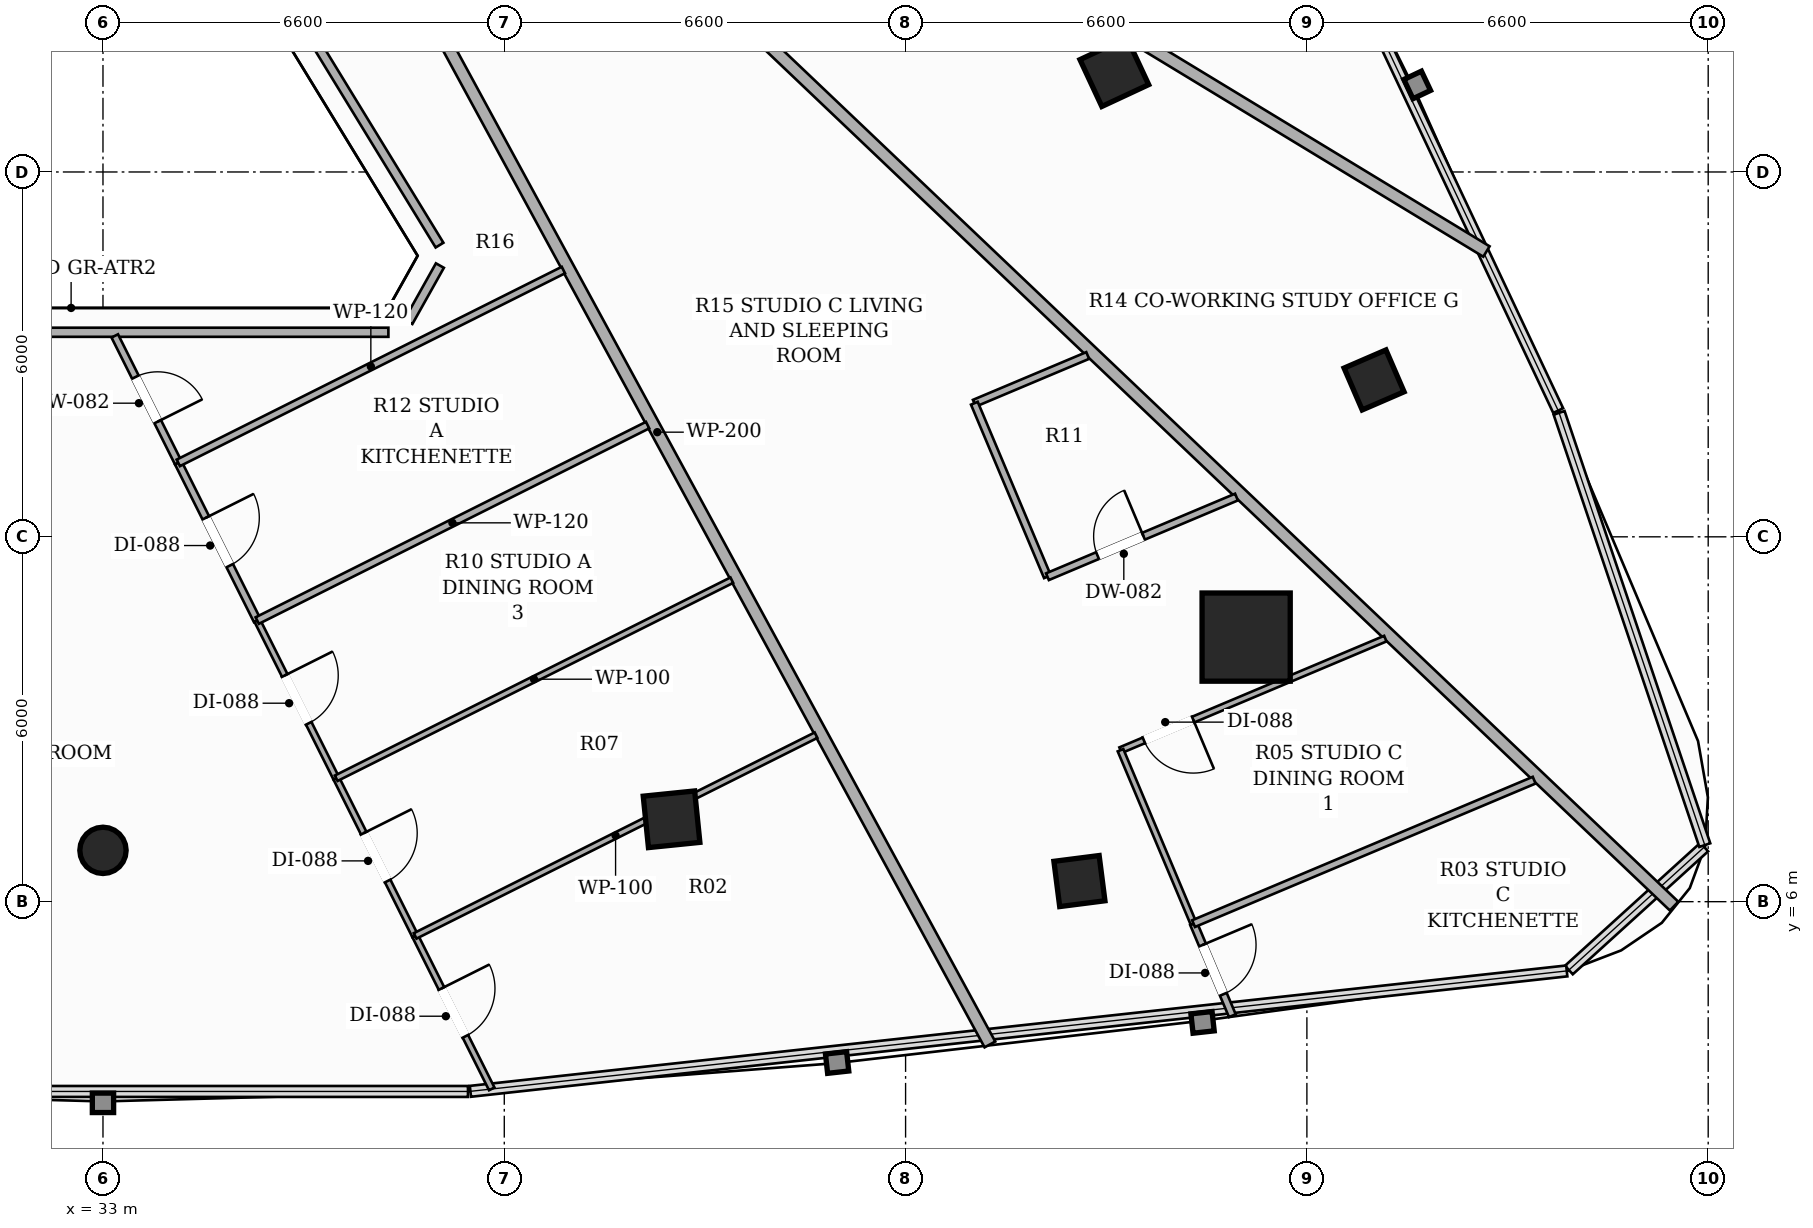
"""IFC4 building model, lengths in metres.
Left out: names, types, materials, properties, quantities, classifications, styles, units other than length and angle.
Written with IfcOpenShell. Run it as: python <this file> out.ifc"""

import sys

from ifc_helpers import new_model, si_unit, direction, frame, frame_2d, origin, origin_2d, place, context, subcontext, project, spatial, rectangle, hollow_rectangle, hollow_circle, extrude, element, fill, save


model = new_model("IFC4")
c1 = context("Model", 3, precision=1e-05, world=origin(), true_north=direction((0.0, 1.0)))
c2 = subcontext(c1, "Body", "Model", "MODEL_VIEW")
j1 = project(units=[si_unit("LENGTHUNIT", "METRE"), si_unit("PLANEANGLEUNIT", "RADIAN")], contexts=[c1])
p1 = place(None, origin())
s1 = spatial("IfcSite", under=j1, at=p1, CompositionType="ELEMENT")
p2 = place(p1, origin())
s2 = spatial("IfcBuilding", under=s1, at=p2, CompositionType="ELEMENT")
p3 = place(p2, frame((0.0, 0.0, 110.0)))
s3 = spatial("IfcBuildingStorey", under=s2, at=p3, CompositionType="ELEMENT", Elevation=110.0)
p4 = place(p3, frame((51.801, 10.351, 0.0), z_axis=(0.0, 0.0, 1.0), x_axis=(1.0, 0.0, 0.0)))
e1 = element("IfcColumn", 1, at=p4, inside=s3, PredefinedType="COLUMN", context=c2, shape_type="SweptSolid", body=[
    extrude(hollow_rectangle(XDim=1.45, YDim=1.45, WallThickness=0.045, at=origin_2d()), origin(), (0.0, 0.0, 1.0), 3.3),
])
p5 = place(p3, frame((33.0, 6.844, 0.0), z_axis=(0.0, 0.0, 1.0), x_axis=(1.0, 0.0, 0.0)))
e2 = element("IfcColumn", 2, at=p5, inside=s3, PredefinedType="COLUMN", context=c2, shape_type="SweptSolid", body=[
    extrude(hollow_circle(Radius=0.381, WallThickness=0.022, at=origin_2d()), origin(), (0.0, 0.0, 1.0), 3.3),
])
for number, where, z_axis, x_axis in (
    (3, (42.351, 7.355, 0.0), (0.0, 0.0, 1.0), (0.995, 0.101, 0.0)),
    (4, (49.633, 19.642, 0.0), (0.0, 0.0, 1.0), (-0.423, 0.906, 0.0)),
):
    element("IfcColumn", number, at=place(p3, frame(where, z_axis=z_axis, x_axis=x_axis)), inside=s3, PredefinedType="COLUMN", context=c2, shape_type="SweptSolid", body=[
        extrude(hollow_rectangle(XDim=0.85, YDim=0.85, WallThickness=0.028, at=origin_2d()), origin(), (0.0, 0.0, 1.0), 3.3),
    ])
for number, where, z_axis, x_axis in (
    (5, (49.059, 6.339, 0.0), (0.0, 0.0, 1.0), (0.992, 0.127, 0.0)),
    (6, (53.905, 14.58, 0.0), (0.0, 0.0, 1.0), (-0.397, 0.918, 0.0)),
):
    element("IfcColumn", number, at=place(p3, frame(where, z_axis=z_axis, x_axis=x_axis)), inside=s3, PredefinedType="COLUMN", context=c2, shape_type="SweptSolid", body=[
        extrude(hollow_rectangle(XDim=0.75, YDim=0.75, WallThickness=0.025, at=origin_2d()), origin(), (0.0, 0.0, 1.0), 3.3),
    ])
p6 = place(p3, frame((34.257, 23.79, 0.0), z_axis=(0.0, 0.0, 1.0), x_axis=(0.521839061235, -0.853043957935, 0.0)))
e7 = element("IfcWall", 7, at=p6, inside=s3, PredefinedType="PARTITIONING", context=c2, shape_type="SweptSolid", body=[
    extrude(rectangle(XDim=8.198, YDim=0.15, at=frame_2d((4.099, 0.0))), origin(), (0.0, 0.0, 1.0), 2.721),
])
p7 = place(p3, frame((38.541, 16.461, 0.0), z_axis=(0.0, 0.0, 1.0), x_axis=(-0.488631416095, -0.872490308946, 0.0)))
e8 = element("IfcWall", 8, at=p7, inside=s3, PredefinedType="PARTITIONING", context=c2, shape_type="SweptSolid", body=[
    extrude(rectangle(XDim=1.06, YDim=0.15, at=frame_2d((0.53, 0.0))), origin(), (0.0, 0.0, 1.0), 3.06),
])
p8 = place(p3, frame((37.694, 15.364, 0.0), z_axis=(0.0, 0.0, 1.0), x_axis=(-1.0, 0.0, 0.0)))
e9 = element("IfcWall", 9, at=p8, inside=s3, PredefinedType="PARTITIONING", context=c2, shape_type="SweptSolid", body=[
    extrude(rectangle(XDim=9.388, YDim=0.15, at=frame_2d((4.694, 0.0))), origin(), (0.0, 0.0, 1.0), 2.721),
])
p9 = place(p3, frame((36.646, 23.79, 0.0), z_axis=(0.0, 0.0, 1.0), x_axis=(0.477391569207, -0.878690667784, 0.0)))
e10 = element("IfcWall", 10, at=p9, inside=s3, PredefinedType="PARTITIONING", context=c2, shape_type="SweptSolid", body=[
    extrude(rectangle(XDim=22.918, YDim=0.2, at=frame_2d((11.459, 0.0))), origin(), (0.0, 0.0, 1.0), 2.413),
])
p10 = place(p3, frame((40.056, 23.79, 0.0), z_axis=(0.0, 0.0, 1.0), x_axis=(0.724633427165, -0.68913452695, 0.0)))
e11 = element("IfcWall", 11, at=p10, inside=s3, PredefinedType="PARTITIONING", context=c2, shape_type="SweptSolid", body=[
    extrude(rectangle(XDim=25.921, YDim=0.2, at=frame_2d((12.96, 0.0))), origin(), (0.0, 0.0, 1.0), 2.413),
])
p11 = place(p3, frame((55.753, 16.692, 0.0), z_axis=(0.0, 0.0, 1.0), x_axis=(-0.85489976131, 0.518793213248, 0.0)))
e12 = element("IfcWall", 12, at=p11, inside=s3, PredefinedType="PARTITIONING", context=c2, shape_type="SweptSolid", body=[
    extrude(rectangle(XDim=15.608, YDim=0.2, at=frame_2d((7.804, 0.0))), origin(), (0.0, 0.0, 1.0), 2.413),
])
p12 = place(p3, frame((33.194, 15.304, 0.0), z_axis=(0.0, 0.0, 1.0), x_axis=(0.447548179666, -0.894259820677, 0.0)))
e13 = element("IfcWall", 13, at=p12, inside=s3, PredefinedType="PARTITIONING", context=c2, shape_type="SweptSolid", body=[
    extrude(rectangle(XDim=2.335, YDim=0.12, at=frame_2d((1.167, 0.0))), origin(), (0.0, 0.0, 1.0), 2.721),
])
p13 = place(p12, frame((0.757, 0.0, 0.0)))
e14 = element("IfcOpeningElement", 14, at=p13, cuts=e13, PredefinedType="OPENING", context=c2, shape_type="SweptSolid", body=[
    extrude(rectangle(XDim=0.82, YDim=2.1, at=frame_2d((0.41, 1.05))), frame((0.0, 0.07, 0.0), z_axis=(0.0, -1.0, 0.0), x_axis=(1.0, 0.0, 0.0)), (0.0, 0.0, 1.0), 0.14),
])
p14 = place(p3, frame((34.239, 13.216, 0.0), z_axis=(0.0, 0.0, 1.0), x_axis=(0.447651342751, -0.894208183441, 0.0)))
e15 = element("IfcWall", 15, at=p14, inside=s3, PredefinedType="PARTITIONING", context=c2, shape_type="SweptSolid", body=[
    extrude(rectangle(XDim=2.9, YDim=0.12, at=frame_2d((1.45, 0.0))), origin(), (0.0, 0.0, 1.0), 3.06),
])
p15 = place(p14, frame((1.01, 0.0, 0.0)))
e16 = element("IfcOpeningElement", 16, at=p15, cuts=e15, PredefinedType="OPENING", context=c2, shape_type="SweptSolid", body=[
    extrude(rectangle(XDim=0.88, YDim=2.1, at=frame_2d((0.44, 1.05))), frame((0.0, 0.07, 0.0), z_axis=(0.0, -1.0, 0.0), x_axis=(1.0, 0.0, 0.0)), (0.0, 0.0, 1.0), 0.14),
])
p16 = place(p3, frame((38.134, 5.437, 0.0), z_axis=(0.0, 0.0, 1.0), x_axis=(0.447768773835, -0.894149386388, 0.0)))
e17 = element("IfcWall", 17, at=p16, inside=s3, PredefinedType="PARTITIONING", context=c2, shape_type="SweptSolid", body=[
    extrude(rectangle(XDim=2.814, YDim=0.1, at=frame_2d((1.407, 0.0))), origin(), (0.0, 0.0, 1.0), 3.06),
])
p17 = place(p16, frame((0.967, 0.0, 0.0)))
e18 = element("IfcOpeningElement", 18, at=p17, cuts=e17, PredefinedType="OPENING", context=c2, shape_type="SweptSolid", body=[
    extrude(rectangle(XDim=0.88, YDim=2.1, at=frame_2d((0.44, 1.05))), frame((0.0, 0.06, 0.0), z_axis=(0.0, -1.0, 0.0), x_axis=(1.0, 0.0, 0.0)), (0.0, 0.0, 1.0), 0.12),
])
p18 = place(p3, frame((36.836, 8.03, 0.0), z_axis=(0.0, 0.0, 1.0), x_axis=(0.447651342751, -0.894208183441, 0.0)))
e19 = element("IfcWall", 19, at=p18, inside=s3, PredefinedType="PARTITIONING", context=c2, shape_type="SweptSolid", body=[
    extrude(rectangle(XDim=2.9, YDim=0.1, at=frame_2d((1.45, 0.0))), origin(), (0.0, 0.0, 1.0), 2.413),
])
p19 = place(p18, frame((1.01, 0.0, 0.0)))
e20 = element("IfcOpeningElement", 20, at=p19, cuts=e19, PredefinedType="OPENING", context=c2, shape_type="SweptSolid", body=[
    extrude(rectangle(XDim=0.88, YDim=2.1, at=frame_2d((0.44, 1.05))), frame((0.0, 0.06, 0.0), z_axis=(0.0, -1.0, 0.0), x_axis=(1.0, 0.0, 0.0)), (0.0, 0.0, 1.0), 0.12),
])
p20 = place(p3, frame((35.537, 10.623, 0.0), z_axis=(0.0, 0.0, 1.0), x_axis=(0.447853271476, -0.894107066983, 0.0)))
e21 = element("IfcWall", 21, at=p20, inside=s3, PredefinedType="PARTITIONING", context=c2, shape_type="SweptSolid", body=[
    extrude(rectangle(XDim=2.9, YDim=0.1, at=frame_2d((1.45, 0.0))), origin(), (0.0, 0.0, 1.0), 3.06),
])
p21 = place(p20, frame((1.01, 0.0, 0.0)))
e22 = element("IfcOpeningElement", 22, at=p21, cuts=e21, PredefinedType="OPENING", context=c2, shape_type="SweptSolid", body=[
    extrude(rectangle(XDim=0.88, YDim=2.1, at=frame_2d((0.44, 1.05))), frame((0.0, 0.06, 0.0), z_axis=(0.0, -1.0, 0.0), x_axis=(1.0, 0.0, 0.0)), (0.0, 0.0, 1.0), 0.12),
])
p22 = place(p3, frame((40.572, 16.387, 0.0), z_axis=(0.0, 0.0, 1.0), x_axis=(-0.894178861749, -0.447709909653, 0.0)))
e23 = element("IfcWall", 23, at=p22, inside=s3, PredefinedType="PARTITIONING", context=c2, shape_type="SweptSolid", body=[
    extrude(rectangle(XDim=7.083, YDim=0.12, at=frame_2d((3.541, 0.0))), origin(), (0.0, 0.0, 1.0), 2.721),
])
p23 = place(p3, frame((41.957, 13.837, 0.0), z_axis=(0.0, 0.0, 1.0), x_axis=(-0.894209449688, -0.447648813344, 0.0)))
e24 = element("IfcWall", 24, at=p23, inside=s3, PredefinedType="PARTITIONING", context=c2, shape_type="SweptSolid", body=[
    extrude(rectangle(XDim=7.179, YDim=0.12, at=frame_2d((3.59, 0.0))), origin(), (0.0, 0.0, 1.0), 2.721),
])
p24 = place(p3, frame((38.134, 5.437, 0.0), z_axis=(0.0, 0.0, 1.0), x_axis=(0.894182030014, 0.447703581849, 0.0)))
e25 = element("IfcWall", 25, at=p24, inside=s3, PredefinedType="PARTITIONING", context=c2, shape_type="SweptSolid", body=[
    extrude(rectangle(XDim=7.373, YDim=0.1, at=frame_2d((3.687, 0.0))), origin(), (0.0, 0.0, 1.0), 2.413),
])
p25 = place(p3, frame((36.836, 8.03, 0.0), z_axis=(0.0, 0.0, 1.0), x_axis=(0.894205618721, 0.447656465884, 0.0)))
e26 = element("IfcWall", 26, at=p25, inside=s3, PredefinedType="PARTITIONING", context=c2, shape_type="SweptSolid", body=[
    extrude(rectangle(XDim=7.276, YDim=0.1, at=frame_2d((3.638, 0.0))), origin(), (0.0, 0.0, 1.0), 2.721),
])
p26 = place(p3, frame((49.195, 14.982, 0.0), z_axis=(0.0, 0.0, 1.0), x_axis=(-0.921624013763, -0.38808398222, 0.0)))
e27 = element("IfcWall", 27, at=p26, inside=s3, PredefinedType="PARTITIONING", context=c2, shape_type="SweptSolid", body=[
    extrude(rectangle(XDim=2.022, YDim=0.12, at=frame_2d((1.011, 0.0))), origin(), (0.0, 0.0, 1.0), 2.492),
])
p27 = place(p3, frame((47.331, 14.197, 0.0), z_axis=(0.0, 0.0, 1.0), x_axis=(0.388229743903, -0.921562621827, 0.0)))
e28 = element("IfcWall", 28, at=p27, inside=s3, PredefinedType="PARTITIONING", context=c2, shape_type="SweptSolid", body=[
    extrude(rectangle(XDim=3.096, YDim=0.12, at=frame_2d((1.548, 0.0))), origin(), (0.0, 0.0, 1.0), 3.06),
])
p28 = place(p3, frame((48.533, 11.344, 0.0), z_axis=(0.0, 0.0, 1.0), x_axis=(0.921534547548, 0.388296378653, 0.0)))
e29 = element("IfcWall", 29, at=p28, inside=s3, PredefinedType="PARTITIONING", context=c2, shape_type="SweptSolid", body=[
    extrude(rectangle(XDim=3.374, YDim=0.12, at=frame_2d((1.687, 0.0))), origin(), (0.0, 0.0, 1.0), 2.492),
])
p29 = place(p28, frame((0.894, 0.0, 0.0)))
e30 = element("IfcOpeningElement", 30, at=p29, cuts=e29, PredefinedType="OPENING", context=c2, shape_type="SweptSolid", body=[
    extrude(rectangle(XDim=0.82, YDim=2.1, at=frame_2d((0.41, 1.05))), frame((0.0, 0.07, 0.0), z_axis=(0.0, -1.0, 0.0), x_axis=(1.0, 0.0, 0.0)), (0.0, 0.0, 1.0), 0.14),
])
p30 = place(p3, frame((50.936, 5.639, 0.0), z_axis=(0.0, 0.0, 1.0), x_axis=(0.3883160894, -0.92152624201, 0.0)))
e31 = element("IfcWall", 31, at=p30, inside=s3, PredefinedType="PARTITIONING", context=c2, shape_type="SweptSolid", body=[
    extrude(rectangle(XDim=1.643, YDim=0.12, at=frame_2d((0.821, 0.0))), origin(), (0.0, 0.0, 1.0), 2.619),
])
p31 = place(p30, frame((0.381, 0.0, 0.0)))
e32 = element("IfcOpeningElement", 32, at=p31, cuts=e31, PredefinedType="OPENING", context=c2, shape_type="SweptSolid", body=[
    extrude(rectangle(XDim=0.88, YDim=2.1, at=frame_2d((0.44, 1.05))), frame((0.0, 0.07, 0.0), z_axis=(0.0, -1.0, 0.0), x_axis=(1.0, 0.0, 0.0)), (0.0, 0.0, 1.0), 0.14),
])
p32 = place(p3, frame((54.09, 10.326, 0.0), z_axis=(0.0, 0.0, 1.0), x_axis=(-0.921538100995, -0.388287945234, 0.0)))
e33 = element("IfcWall", 33, at=p32, inside=s3, PredefinedType="PARTITIONING", context=c2, shape_type="SweptSolid", body=[
    extrude(rectangle(XDim=4.726, YDim=0.1, at=frame_2d((2.363, 0.0))), origin(), (0.0, 0.0, 1.0), 2.413),
])
p33 = place(p32, frame((3.429, 0.0, 0.0)))
e34 = element("IfcOpeningElement", 34, at=p33, cuts=e33, PredefinedType="OPENING", context=c2, shape_type="SweptSolid", body=[
    extrude(rectangle(XDim=0.88, YDim=2.1, at=frame_2d((0.44, 1.05))), frame((0.0, 0.06, 0.0), z_axis=(0.0, -1.0, 0.0), x_axis=(1.0, 0.0, 0.0)), (0.0, 0.0, 1.0), 0.12),
])
p34 = place(p3, frame((49.735, 8.491, 0.0), z_axis=(0.0, 0.0, 1.0), x_axis=(0.388074634892, -0.921627949746, 0.0)))
e35 = element("IfcWall", 35, at=p34, inside=s3, PredefinedType="PARTITIONING", context=c2, shape_type="SweptSolid", body=[
    extrude(rectangle(XDim=3.094, YDim=0.1, at=frame_2d((1.547, 0.0))), origin(), (0.0, 0.0, 1.0), 2.413),
])
p35 = place(p3, frame((50.936, 5.639, 0.0), z_axis=(0.0, 0.0, 1.0), x_axis=(0.921613448603, 0.388109071466, 0.0)))
e36 = element("IfcWall", 36, at=p35, inside=s3, PredefinedType="PARTITIONING", context=c2, shape_type="SweptSolid", body=[
    extrude(rectangle(XDim=6.079, YDim=0.12, at=frame_2d((3.039, 0.0))), origin(), (0.0, 0.0, 1.0), 2.619),
])
p36 = place(p13, origin())
e37 = element("IfcDoor", 37, at=p36, inside=s3, OperationType="SINGLE_SWING_RIGHT", PredefinedType="DOOR", context=c2, shape_type="SweptSolid", body=[
    extrude(rectangle(XDim=0.82, YDim=2.1, at=frame_2d((0.41, 1.05))), frame((0.0, 0.025, 0.0), z_axis=(0.0, -1.0, 0.0), x_axis=(1.0, 0.0, 0.0)), (0.0, 0.0, 1.0), 0.05),
])
fill(e14, e37)
p37 = place(p15, origin())
e38 = element("IfcDoor", 38, at=p37, inside=s3, OperationType="SINGLE_SWING_LEFT", PredefinedType="DOOR", context=c2, shape_type="SweptSolid", body=[
    extrude(rectangle(XDim=0.88, YDim=2.1, at=frame_2d((0.44, 1.05))), frame((0.0, 0.025, 0.0), z_axis=(0.0, -1.0, 0.0), x_axis=(1.0, 0.0, 0.0)), (0.0, 0.0, 1.0), 0.05),
])
fill(e16, e38)
p38 = place(p17, origin())
e39 = element("IfcDoor", 39, at=p38, inside=s3, OperationType="SINGLE_SWING_LEFT", PredefinedType="DOOR", context=c2, shape_type="SweptSolid", body=[
    extrude(rectangle(XDim=0.88, YDim=2.1, at=frame_2d((0.44, 1.05))), frame((0.0, 0.025, 0.0), z_axis=(0.0, -1.0, 0.0), x_axis=(1.0, 0.0, 0.0)), (0.0, 0.0, 1.0), 0.05),
])
fill(e18, e39)
p39 = place(p19, origin())
e40 = element("IfcDoor", 40, at=p39, inside=s3, OperationType="SINGLE_SWING_LEFT", PredefinedType="DOOR", context=c2, shape_type="SweptSolid", body=[
    extrude(rectangle(XDim=0.88, YDim=2.1, at=frame_2d((0.44, 1.05))), frame((0.0, 0.025, 0.0), z_axis=(0.0, -1.0, 0.0), x_axis=(1.0, 0.0, 0.0)), (0.0, 0.0, 1.0), 0.05),
])
fill(e20, e40)
p40 = place(p21, origin())
e41 = element("IfcDoor", 41, at=p40, inside=s3, OperationType="SINGLE_SWING_LEFT", PredefinedType="DOOR", context=c2, shape_type="SweptSolid", body=[
    extrude(rectangle(XDim=0.88, YDim=2.1, at=frame_2d((0.44, 1.05))), frame((0.0, 0.025, 0.0), z_axis=(0.0, -1.0, 0.0), x_axis=(1.0, 0.0, 0.0)), (0.0, 0.0, 1.0), 0.05),
])
fill(e22, e41)
p41 = place(p29, origin())
e42 = element("IfcDoor", 42, at=p41, inside=s3, OperationType="SINGLE_SWING_RIGHT", PredefinedType="DOOR", context=c2, shape_type="SweptSolid", body=[
    extrude(rectangle(XDim=0.82, YDim=2.1, at=frame_2d((0.41, 1.05))), frame((0.0, 0.025, 0.0), z_axis=(0.0, -1.0, 0.0), x_axis=(1.0, 0.0, 0.0)), (0.0, 0.0, 1.0), 0.05),
])
fill(e30, e42)
p42 = place(p31, origin())
e43 = element("IfcDoor", 43, at=p42, inside=s3, OperationType="SINGLE_SWING_LEFT", PredefinedType="DOOR", context=c2, shape_type="SweptSolid", body=[
    extrude(rectangle(XDim=0.88, YDim=2.1, at=frame_2d((0.44, 1.05))), frame((0.0, 0.025, 0.0), z_axis=(0.0, -1.0, 0.0), x_axis=(1.0, 0.0, 0.0)), (0.0, 0.0, 1.0), 0.05),
])
fill(e32, e43)
p43 = place(p33, origin())
e44 = element("IfcDoor", 44, at=p43, inside=s3, OperationType="SINGLE_SWING_LEFT", PredefinedType="DOOR", context=c2, shape_type="SweptSolid", body=[
    extrude(rectangle(XDim=0.88, YDim=2.1, at=frame_2d((0.44, 1.05))), frame((0.0, 0.025, 0.0), z_axis=(0.0, -1.0, 0.0), x_axis=(1.0, 0.0, 0.0)), (0.0, 0.0, 1.0), 0.05),
])
fill(e34, e44)
save(model, sys.argv[1])
